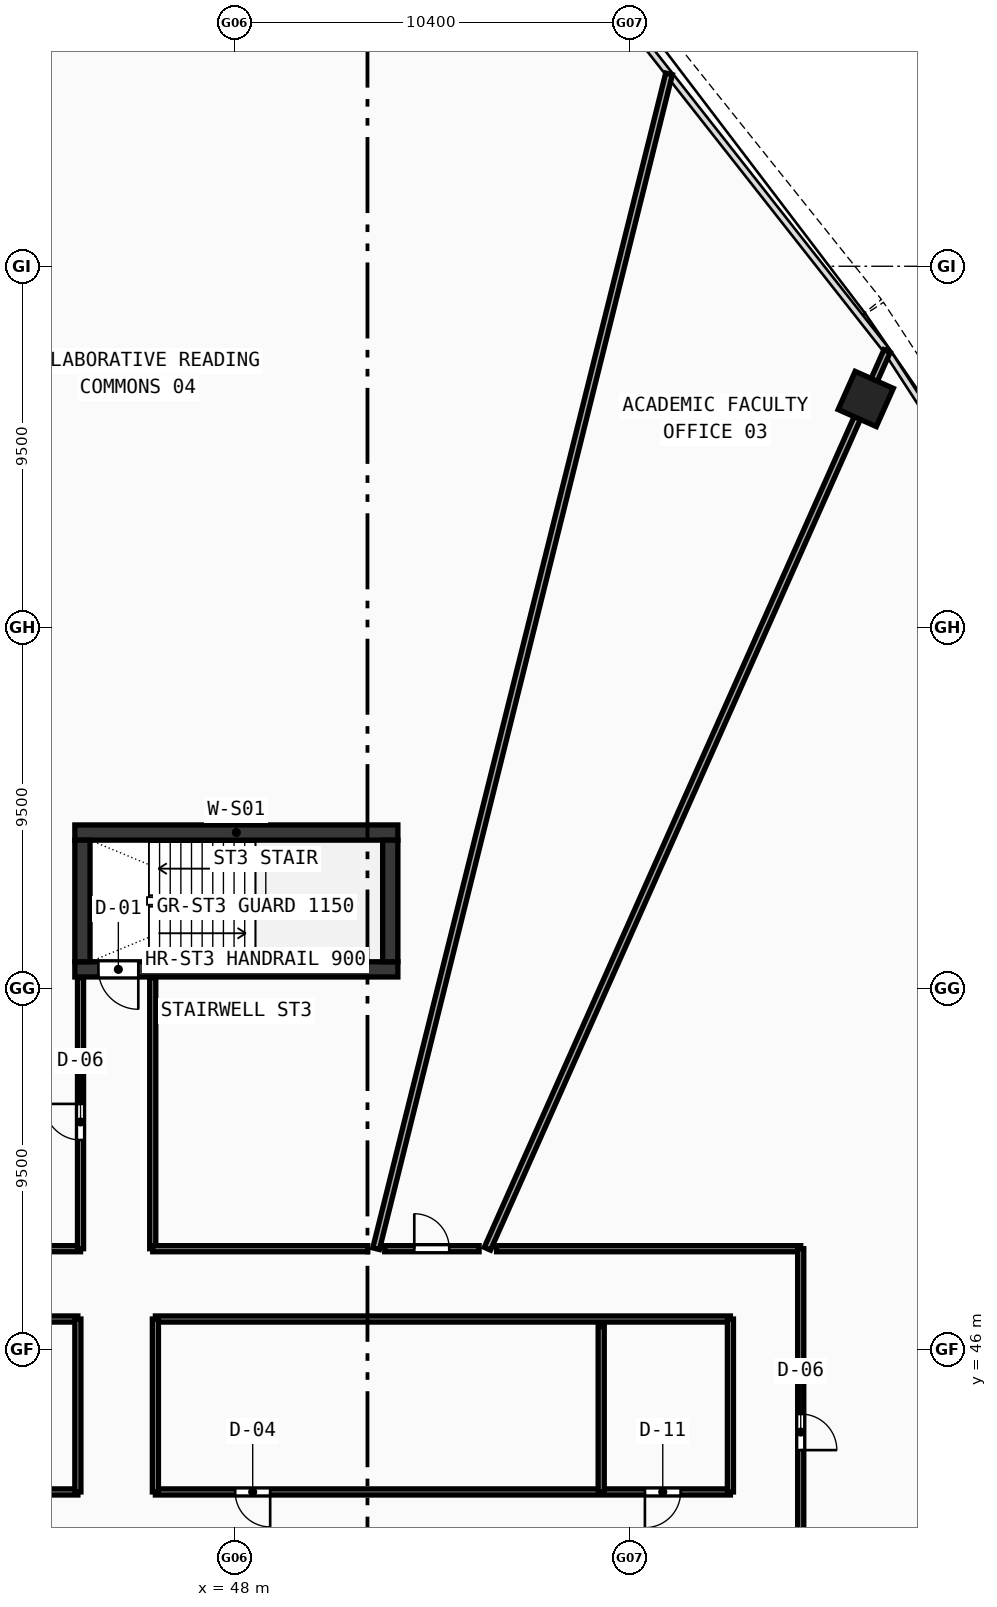
"""IFC4 building model, lengths in metres.
Left out: names, types, materials, properties, quantities, classifications, styles, units other than length and angle.
Written with IfcOpenShell. Run it as: python <this file> out.ifc"""

import sys

from ifc_helpers import new_model, si_unit, direction, frame, frame_2d, origin, origin_with_axes, origin_2d, place, context, subcontext, project, spatial, rectangle, hollow_rectangle, extrude, source, transform, mapped, element, fill, save


model = new_model("IFC4")
c1 = context("Model", 3, precision=1e-05, world=origin(), true_north=direction((0.0, 1.0)))
c2 = subcontext(c1, "Body", "Model", "MODEL_VIEW")
j1 = project(units=[si_unit("LENGTHUNIT", "METRE"), si_unit("PLANEANGLEUNIT", "RADIAN")], contexts=[c1])
p1 = place(None, origin())
s1 = spatial("IfcSite", under=j1, at=p1, CompositionType="ELEMENT")
p2 = place(p1, origin())
s2 = spatial("IfcBuilding", under=s1, at=p2, CompositionType="ELEMENT")
p3 = place(p2, frame((0.0, 0.0, 55.81)))
s3 = spatial("IfcBuildingStorey", under=s2, at=p3, CompositionType="ELEMENT", Elevation=55.81)
p4 = place(p3, frame((43.8, 59.6, 0.0), z_axis=(0.0, 0.0, 1.0), x_axis=(1.0, 0.0, 0.0)))
e1 = element("IfcWall", 1, at=p4, inside=s3, PredefinedType="SHEAR", context=c2, shape_type="SweptSolid", body=[
    extrude(rectangle(XDim=8.5, YDim=0.4, at=frame_2d((4.25, 0.0))), origin(), (0.0, 0.0, 1.0), 3.37),
])
p5 = place(p3, frame((43.8, 56.0, 0.0), z_axis=(0.0, 0.0, 1.0), x_axis=(1.0, 0.0, 0.0)))
e2 = element("IfcWall", 2, at=p5, inside=s3, PredefinedType="SHEAR", context=c2, shape_type="SweptSolid", body=[
    extrude(rectangle(XDim=8.5, YDim=0.4, at=frame_2d((4.25, 0.0))), origin(), (0.0, 0.0, 1.0), 3.37),
])
p6 = place(p5, frame((0.62, 0.0, 0.0)))
e3 = element("IfcOpeningElement", 3, at=p6, cuts=e2, PredefinedType="OPENING", context=c2, shape_type="SweptSolid", body=[
    extrude(rectangle(XDim=1.05, YDim=2.1, at=frame_2d((0.525, 1.05))), frame((0.0, 0.21, 0.0), z_axis=(0.0, -1.0, 0.0), x_axis=(1.0, 0.0, 0.0)), (0.0, 0.0, 1.0), 0.42),
])
for number, where, z_axis, x_axis in (
    (4, (44.0, 56.2, 0.0), (0.0, 0.0, 1.0), (0.0, 1.0, 0.0)),
    (5, (52.1, 56.2, 0.0), (0.0, 0.0, 1.0), (0.0, 1.0, 0.0)),
):
    element("IfcWall", number, at=place(p3, frame(where, z_axis=z_axis, x_axis=x_axis)), inside=s3, PredefinedType="SHEAR", context=c2, shape_type="SweptSolid", body=[
        extrude(rectangle(XDim=3.2, YDim=0.4, at=frame_2d((1.6, 0.0))), origin(), (0.0, 0.0, 1.0), 3.37),
    ])
m1 = source(origin(), c2, "Body", "SweptSolid", [
    extrude(hollow_rectangle(XDim=1.1, YDim=1.1, WallThickness=0.045, at=origin_2d()), origin(), (0.0, 0.0, 1.0), 3.63),
])
p7 = place(p3, frame((64.611, 71.009, -0.26), z_axis=(0.0, 0.0, 1.0), x_axis=(-0.913545457643, 0.406736643076, 0.0)))
e6 = element("IfcColumn", 6, at=p7, inside=s3, PredefinedType="COLUMN", context=c2, shape_type="MappedRepresentation", body=[
    mapped(m1, transform((0.0, 0.0, 0.0), scale=1.0)),
])
p8 = place(p3, frame((33.65, 42.25, 0.0), z_axis=(0.0, 0.0, 1.0), x_axis=(1.0, 0.0, 0.0)))
e7 = element("IfcWall", 7, at=p8, inside=s3, PredefinedType="PARTITIONING", context=c2, shape_type="SweptSolid", body=[
    extrude(rectangle(XDim=10.23, YDim=0.16, at=frame_2d((5.115, 0.0))), origin(), (0.0, 0.0, 1.0), 2.67),
])
p9 = place(p8, frame((1.15, 0.0, 0.0)))
e8 = element("IfcOpeningElement", 8, at=p9, cuts=e7, PredefinedType="OPENING", context=c2, shape_type="SweptSolid", body=[
    extrude(rectangle(XDim=0.92, YDim=2.1, at=frame_2d((0.46, 1.05))), frame((0.0, 0.09, 0.0), z_axis=(0.0, -1.0, 0.0), x_axis=(1.0, 0.0, 0.0)), (0.0, 0.0, 1.0), 0.18),
])
p10 = place(p8, frame((4.65, 0.0, 0.0)))
e9 = element("IfcOpeningElement", 9, at=p10, cuts=e7, PredefinedType="OPENING", context=c2, shape_type="SweptSolid", body=[
    extrude(rectangle(XDim=0.92, YDim=2.1, at=frame_2d((0.46, 1.05))), frame((0.0, 0.09, 0.0), z_axis=(0.0, -1.0, 0.0), x_axis=(1.0, 0.0, 0.0)), (0.0, 0.0, 1.0), 0.18),
])
p11 = place(p3, frame((33.65, 46.8, 0.0), z_axis=(0.0, 0.0, 1.0), x_axis=(1.0, 0.0, 0.0)))
e10 = element("IfcWall", 10, at=p11, inside=s3, PredefinedType="PARTITIONING", context=c2, shape_type="SweptSolid", body=[
    extrude(rectangle(XDim=10.23, YDim=0.16, at=frame_2d((5.115, 0.0))), origin(), (0.0, 0.0, 1.0), 2.67),
])
p12 = place(p3, frame((43.88, 42.25, 0.0), z_axis=(0.0, 0.0, 1.0), x_axis=(0.0, 1.0, 0.0)))
e11 = element("IfcWall", 11, at=p12, inside=s3, PredefinedType="PARTITIONING", context=c2, shape_type="SweptSolid", body=[
    extrude(rectangle(XDim=4.55, YDim=0.16, at=frame_2d((2.275, 0.0))), origin(), (0.0, 0.0, 1.0), 2.67),
])
p13 = place(p3, frame((45.92, 42.25, 0.0), z_axis=(0.0, 0.0, 1.0), x_axis=(1.0, 0.0, 0.0)))
e12 = element("IfcWall", 12, at=p13, inside=s3, PredefinedType="PARTITIONING", context=c2, shape_type="SweptSolid", body=[
    extrude(rectangle(XDim=15.13, YDim=0.16, at=frame_2d((7.565, 0.0))), origin(), (0.0, 0.0, 1.0), 2.67),
])
p14 = place(p13, frame((2.1, 0.0, 0.0)))
e13 = element("IfcOpeningElement", 13, at=p14, cuts=e12, PredefinedType="OPENING", context=c2, shape_type="SweptSolid", body=[
    extrude(rectangle(XDim=0.92, YDim=2.1, at=frame_2d((0.46, 1.05))), frame((0.0, 0.09, 0.0), z_axis=(0.0, -1.0, 0.0), x_axis=(1.0, 0.0, 0.0)), (0.0, 0.0, 1.0), 0.18),
])
p15 = place(p13, frame((12.88, 0.0, 0.0)))
e14 = element("IfcOpeningElement", 14, at=p15, cuts=e12, PredefinedType="OPENING", context=c2, shape_type="SweptSolid", body=[
    extrude(rectangle(XDim=0.94, YDim=2.1, at=frame_2d((0.47, 1.05))), frame((0.0, 0.09, 0.0), z_axis=(0.0, -1.0, 0.0), x_axis=(1.0, 0.0, 0.0)), (0.0, 0.0, 1.0), 0.18),
])
p16 = place(p3, frame((45.92, 46.8, 0.0), z_axis=(0.0, 0.0, 1.0), x_axis=(1.0, 0.0, 0.0)))
e15 = element("IfcWall", 15, at=p16, inside=s3, PredefinedType="PARTITIONING", context=c2, shape_type="SweptSolid", body=[
    extrude(rectangle(XDim=15.13, YDim=0.16, at=frame_2d((7.565, 0.0))), origin(), (0.0, 0.0, 1.0), 2.67),
])
p17 = place(p3, frame((45.92, 42.25, 0.0), z_axis=(0.0, 0.0, 1.0), x_axis=(0.0, 1.0, 0.0)))
e16 = element("IfcWall", 16, at=p17, inside=s3, PredefinedType="PARTITIONING", context=c2, shape_type="SweptSolid", body=[
    extrude(rectangle(XDim=4.55, YDim=0.16, at=frame_2d((2.275, 0.0))), origin(), (0.0, 0.0, 1.0), 3.37),
])
p18 = place(p3, frame((61.05, 42.25, 0.0), z_axis=(0.0, 0.0, 1.0), x_axis=(0.0, 1.0, 0.0)))
e17 = element("IfcWall", 17, at=p18, inside=s3, PredefinedType="PARTITIONING", context=c2, shape_type="SweptSolid", body=[
    extrude(rectangle(XDim=4.55, YDim=0.16, at=frame_2d((2.275, 0.0))), origin(), (0.0, 0.0, 1.0), 2.67),
])
p19 = place(p3, frame((57.65, 42.25, 0.0), z_axis=(0.0, 0.0, 1.0), x_axis=(0.0, 1.0, 0.0)))
e18 = element("IfcWall", 18, at=p19, inside=s3, PredefinedType="PARTITIONING", context=c2, shape_type="SweptSolid", body=[
    extrude(rectangle(XDim=4.35, YDim=0.16, at=frame_2d((2.175, 0.0))), origin(), (0.0, 0.0, 1.0), 2.67),
])
p20 = place(p3, frame((62.9, 38.541, 0.0), z_axis=(0.0, 0.0, 1.0), x_axis=(0.951053317048, 0.309026840471, 0.0)))
e19 = element("IfcWall", 19, at=p20, inside=s3, PredefinedType="PARTITIONING", context=c2, shape_type="SweptSolid", body=[
    extrude(rectangle(XDim=19.666, YDim=0.18, at=frame_2d((9.833, 0.0))), origin(), (0.0, 0.0, 1.0), 2.67),
])
p21 = place(p3, frame((54.656, 48.65, 0.0), z_axis=(0.0, 0.0, 1.0), x_axis=(0.406729800422, 0.913548504158, 0.0)))
e20 = element("IfcWall", 20, at=p21, inside=s3, PredefinedType="PARTITIONING", context=c2, shape_type="SweptSolid", body=[
    extrude(rectangle(XDim=25.854, YDim=0.18, at=frame_2d((12.927, 0.0))), origin(), (0.0, 0.0, 1.0), 2.67),
])
p22 = place(p3, frame((51.728, 48.65, 0.0), z_axis=(0.0, 0.0, 1.0), x_axis=(0.241918895985, 0.970296474159, 0.0)))
e21 = element("IfcWall", 21, at=p22, inside=s3, PredefinedType="PARTITIONING", context=c2, shape_type="SweptSolid", body=[
    extrude(rectangle(XDim=31.858, YDim=0.18, at=frame_2d((15.929, 0.0))), origin(), (0.0, 0.0, 1.0), 2.67),
])
p23 = place(p3, frame((41.564, 48.65, 0.0), z_axis=(0.0, 0.0, 1.0), x_axis=(1.0, 0.0, 0.0)))
e22 = element("IfcWall", 22, at=p23, inside=s3, PredefinedType="PARTITIONING", context=c2, shape_type="SweptSolid", body=[
    extrude(rectangle(XDim=2.386, YDim=0.16, at=frame_2d((1.193, 0.0))), origin(), (0.0, 0.0, 1.0), 2.67),
])
p24 = place(p3, frame((43.95, 48.65, 0.0), z_axis=(0.0, 0.0, 1.0), x_axis=(0.0, 1.0, 0.0)))
e23 = element("IfcWall", 23, at=p24, inside=s3, PredefinedType="PARTITIONING", context=c2, shape_type="SweptSolid", body=[
    extrude(rectangle(XDim=7.13, YDim=0.16, at=frame_2d((3.565, 0.0))), origin(), (0.0, 0.0, 1.0), 2.97),
])
p25 = place(p24, frame((2.86, 0.0, 0.0)))
e24 = element("IfcOpeningElement", 24, at=p25, cuts=e23, PredefinedType="OPENING", context=c2, shape_type="SweptSolid", body=[
    extrude(rectangle(XDim=0.95, YDim=2.1, at=frame_2d((0.475, 1.05))), frame((0.0, 0.09, 0.0), z_axis=(0.0, -1.0, 0.0), x_axis=(1.0, 0.0, 0.0)), (0.0, 0.0, 1.0), 0.18),
])
p26 = place(p3, frame((45.85, 55.78, 0.0), z_axis=(0.0, 0.0, 1.0), x_axis=(0.0, -1.0, 0.0)))
e25 = element("IfcWall", 25, at=p26, inside=s3, PredefinedType="PARTITIONING", context=c2, shape_type="SweptSolid", body=[
    extrude(rectangle(XDim=7.13, YDim=0.16, at=frame_2d((3.565, 0.0))), origin(), (0.0, 0.0, 1.0), 2.97),
])
p27 = place(p3, frame((45.85, 48.65, 0.0), z_axis=(0.0, 0.0, 1.0), x_axis=(1.0, 0.0, 0.0)))
e26 = element("IfcWall", 26, at=p27, inside=s3, PredefinedType="PARTITIONING", context=c2, shape_type="SweptSolid", body=[
    extrude(rectangle(XDim=5.658, YDim=0.16, at=frame_2d((2.829, 0.0))), origin(), (0.0, 0.0, 1.0), 3.37),
])
p28 = place(p3, frame((51.954, 48.65, 0.0), z_axis=(0.0, 0.0, 1.0), x_axis=(1.0, 0.0, 0.0)))
e27 = element("IfcWall", 27, at=p28, inside=s3, PredefinedType="PARTITIONING", context=c2, shape_type="SweptSolid", body=[
    extrude(rectangle(XDim=2.482, YDim=0.16, at=frame_2d((1.241, 0.0))), origin(), (0.0, 0.0, 1.0), 2.67),
])
p29 = place(p28, frame((0.778, 0.0, 0.0)))
e28 = element("IfcOpeningElement", 28, at=p29, cuts=e27, PredefinedType="OPENING", context=c2, shape_type="SweptSolid", body=[
    extrude(rectangle(XDim=0.92, YDim=2.1, at=frame_2d((0.46, 1.05))), frame((0.0, 0.09, 0.0), z_axis=(0.0, -1.0, 0.0), x_axis=(1.0, 0.0, 0.0)), (0.0, 0.0, 1.0), 0.18),
])
p30 = place(p3, frame((54.897, 48.65, 0.0), z_axis=(0.0, 0.0, 1.0), x_axis=(1.0, 0.0, 0.0)))
e29 = element("IfcWall", 29, at=p30, inside=s3, PredefinedType="PARTITIONING", context=c2, shape_type="SweptSolid", body=[
    extrude(rectangle(XDim=8.003, YDim=0.16, at=frame_2d((4.001, 0.0))), origin(), (0.0, 0.0, 1.0), 2.97),
])
p31 = place(p3, frame((62.9, 48.65, 0.0), z_axis=(0.0, 0.0, 1.0), x_axis=(0.0, -1.0, 0.0)))
e30 = element("IfcWall", 30, at=p31, inside=s3, PredefinedType="PARTITIONING", context=c2, shape_type="SweptSolid", body=[
    extrude(rectangle(XDim=9.877, YDim=0.16, at=frame_2d((4.938, 0.0))), origin(), (0.0, 0.0, 1.0), 2.67),
])
p32 = place(p31, frame((4.349, 0.0, 0.0)))
e31 = element("IfcOpeningElement", 31, at=p32, cuts=e30, PredefinedType="OPENING", context=c2, shape_type="SweptSolid", body=[
    extrude(rectangle(XDim=0.95, YDim=2.1, at=frame_2d((0.475, 1.05))), frame((0.0, 0.09, 0.0), z_axis=(0.0, -1.0, 0.0), x_axis=(1.0, 0.0, 0.0)), (0.0, 0.0, 1.0), 0.18),
])
m2 = source(origin(), c2, "Body", "SweptSolid", [
    extrude(rectangle(XDim=1.05, YDim=2.1, at=frame_2d((0.525, 1.05))), frame((0.0, 0.025, 0.0), z_axis=(0.0, -1.0, 0.0), x_axis=(1.0, 0.0, 0.0)), (0.0, 0.0, 1.0), 0.05),
])
p33 = place(p6, frame((1.05, 0.0, 0.0), z_axis=(0.0, 0.0, 1.0), x_axis=(-1.0, 0.0, 0.0)))
e32 = element("IfcDoor", 32, at=p33, inside=s3, OperationType="SINGLE_SWING_LEFT", PredefinedType="DOOR", context=c2, shape_type="MappedRepresentation", body=[
    mapped(m2, transform((0.0, 0.0, 0.0), scale=1.0)),
])
fill(e3, e32)
m3 = source(origin(), c2, "Body", "SweptSolid", [
    extrude(rectangle(XDim=0.92, YDim=2.1, at=frame_2d((0.46, 1.05))), frame((0.0, 0.025, 0.0), z_axis=(0.0, -1.0, 0.0), x_axis=(1.0, 0.0, 0.0)), (0.0, 0.0, 1.0), 0.05),
])
p34 = place(p14, frame((0.92, 0.0, 0.0), z_axis=(0.0, 0.0, 1.0), x_axis=(-1.0, 0.0, 0.0)))
e33 = element("IfcDoor", 33, at=p34, inside=s3, OperationType="SINGLE_SWING_LEFT", PredefinedType="DOOR", context=c2, shape_type="MappedRepresentation", body=[
    mapped(m3, transform((0.0, 0.0, 0.0), scale=1.0)),
])
fill(e13, e33)
m4 = source(origin(), c2, "Body", "SweptSolid", [
    extrude(rectangle(XDim=0.94, YDim=2.1, at=frame_2d((0.47, 1.05))), frame((0.0, 0.025, 0.0), z_axis=(0.0, -1.0, 0.0), x_axis=(1.0, 0.0, 0.0)), (0.0, 0.0, 1.0), 0.05),
])
p35 = place(p15, frame((0.94, 0.0, 0.0), z_axis=(0.0, 0.0, 1.0), x_axis=(-1.0, 0.0, 0.0)))
e34 = element("IfcDoor", 34, at=p35, inside=s3, OperationType="SINGLE_SWING_RIGHT", PredefinedType="DOOR", context=c2, shape_type="MappedRepresentation", body=[
    mapped(m4, transform((0.0, 0.0, 0.0), scale=1.0)),
])
fill(e14, e34)
m5 = source(origin(), c2, "Body", "SweptSolid", [
    extrude(rectangle(XDim=0.95, YDim=2.1, at=frame_2d((0.475, 1.05))), frame((0.0, 0.025, 0.0), z_axis=(0.0, -1.0, 0.0), x_axis=(1.0, 0.0, 0.0)), (0.0, 0.0, 1.0), 0.05),
])
p36 = place(p32, origin_with_axes())
e35 = element("IfcDoor", 35, at=p36, inside=s3, OperationType="SINGLE_SWING_RIGHT", PredefinedType="DOOR", context=c2, shape_type="MappedRepresentation", body=[
    mapped(m5, transform((0.0, 0.0, 0.0), scale=1.0)),
])
fill(e31, e35)
p37 = place(p29, origin_with_axes())
e36 = element("IfcDoor", 36, at=p37, inside=s3, OperationType="SINGLE_SWING_LEFT", PredefinedType="DOOR", context=c2, shape_type="MappedRepresentation", body=[
    mapped(m3, transform((0.0, 0.0, 0.0), scale=1.0)),
])
fill(e28, e36)
p38 = place(p25, origin_with_axes())
e37 = element("IfcDoor", 37, at=p38, inside=s3, OperationType="SINGLE_SWING_RIGHT", PredefinedType="DOOR", context=c2, shape_type="MappedRepresentation", body=[
    mapped(m5, transform((0.0, 0.0, 0.0), scale=1.0)),
])
fill(e24, e37)
save(model, sys.argv[1])
